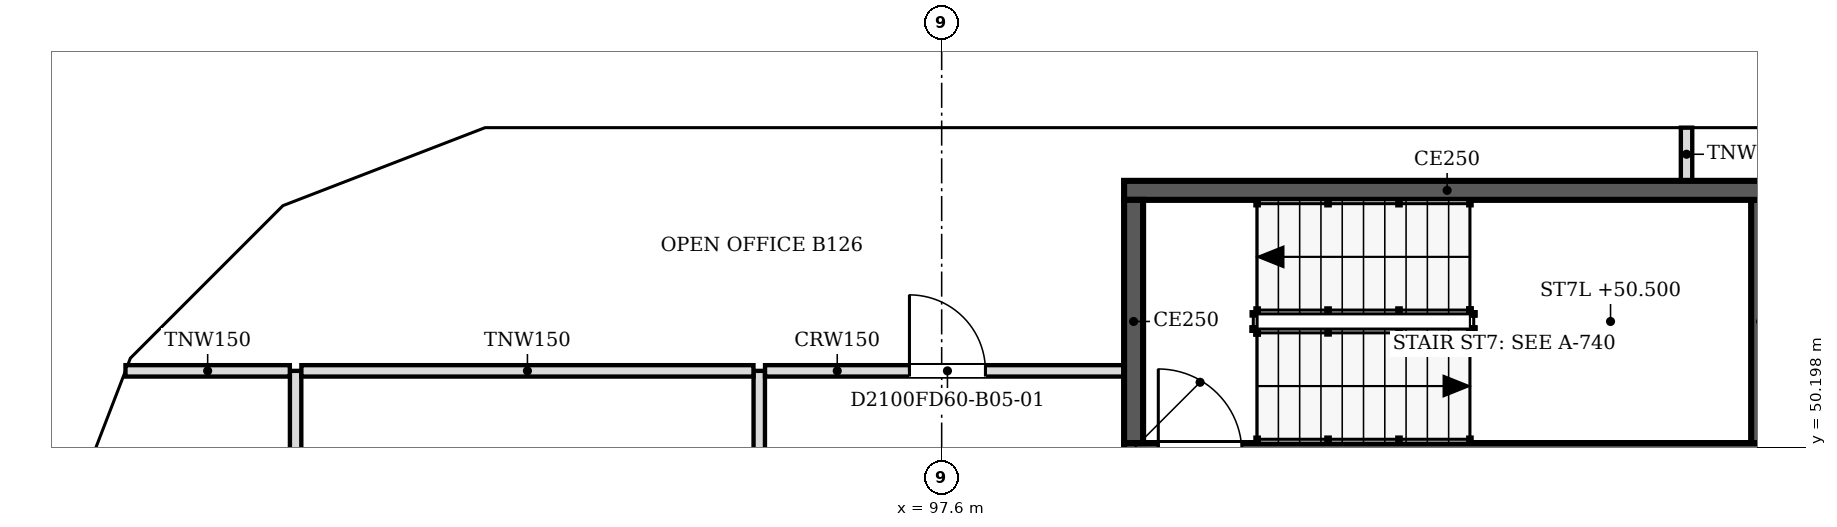
"""IFC4 building model, lengths in metres.
Left out: names, types, materials, properties, quantities, classifications, styles, units other than length and angle.
Written with IfcOpenShell. Run it as: python <this file> out.ifc"""

import sys

from ifc_helpers import new_model, si_unit, direction, frame, frame_2d, origin, place, context, subcontext, project, spatial, polyline, rectangle, outline, extrude, faceted_brep, source, transform, mapped, element, fill, save


model = new_model("IFC4")
c1 = context("Model", 3, precision=1e-05, world=origin(), true_north=direction((0.0, 1.0)))
c2 = subcontext(c1, "Body", "Model", "MODEL_VIEW")
j1 = project(units=[si_unit("LENGTHUNIT", "METRE"), si_unit("PLANEANGLEUNIT", "RADIAN")], contexts=[c1])
p1 = place(None, origin())
s1 = spatial("IfcSite", under=j1, at=p1, CompositionType="ELEMENT")
p2 = place(p1, origin())
s2 = spatial("IfcBuilding", under=s1, at=p2, CompositionType="ELEMENT")
p3 = place(p2, frame((0.0, 0.0, 48.6)))
s3 = spatial("IfcBuildingStorey", under=s2, at=p3, CompositionType="ELEMENT", Elevation=48.6)
m1 = source(origin(), c2, "Body", "SweptSolid", [
    extrude(outline(polyline([(3.05, 0.0), (6.1, 3.8), (3.05, 7.6), (0.0, 3.8), (3.05, 0.0)])), frame((0.0, 0.25, 0.0), z_axis=(0.0, -1.0, 0.0), x_axis=(1.0, 0.0, 0.0)), (0.0, 0.0, 1.0), 0.5),
])
p4 = place(p3, frame((112.85, 54.65, -3.8), z_axis=(0.0, 0.0, 1.0), x_axis=(-1.0, 0.0, 0.0)))
e1 = element("IfcWall", 1, at=p4, inside=s3, PredefinedType="SOLIDWALL", context=c2, shape_type="MappedRepresentation", body=[
    mapped(m1, transform((0.0, 0.0, 0.0), scale=1.0)),
])
m2 = source(origin(), c2, "Body", "SweptSolid", [
    extrude(outline(polyline([(3.05, 0.399), (5.78, 3.8), (3.05, 7.2), (0.321, 3.8), (3.05, 0.399)])), frame((0.0, 0.26, 0.0), z_axis=(0.0, -1.0, 0.0), x_axis=(1.0, 0.0, 0.0)), (0.0, 0.0, 1.0), 0.52),
])
p5 = place(p4, origin())
e2 = element("IfcOpeningElement", 2, at=p5, cuts=e1, PredefinedType="OPENING", context=c2, shape_type="MappedRepresentation", body=[
    mapped(m2, transform((0.0, 0.0, 0.0), scale=1.0)),
])
p6 = place(p3, frame((106.75, 54.65, -3.8), z_axis=(0.0, 0.0, 1.0), x_axis=(-1.0, 0.0, 0.0)))
e3 = element("IfcWall", 3, at=p6, inside=s3, PredefinedType="SOLIDWALL", context=c2, shape_type="MappedRepresentation", body=[
    mapped(m1, transform((0.0, 0.0, 0.0), scale=1.0)),
])
p7 = place(p6, origin())
e4 = element("IfcOpeningElement", 4, at=p7, cuts=e3, PredefinedType="OPENING", context=c2, shape_type="MappedRepresentation", body=[
    mapped(m2, transform((0.0, 0.0, 0.0), scale=1.0)),
])
m3 = source(origin(), c2, "Body", "Brep", [
    faceted_brep([(3.05, -0.25, 0.0), (6.1, -0.25, 3.8), (6.1, -0.25, 3.8), (3.05, -0.25, 7.6), (0.0, -0.25, 3.8), (0.0, 0.25, 3.8), (3.05, 0.25, 7.6), (6.1, 0.25, 3.8), (6.1, 0.25, 3.8), (3.05, 0.25, 0.0)], [[[0, 1, 2, 3, 4]], [[5, 6, 7, 8, 9]], [[9, 8, 1, 0]], [[7, 6, 3, 2]], [[6, 5, 4, 3]], [[5, 9, 0, 4]], [[1, 8, 7, 2]]]),
])
p8 = place(p3, frame((100.65, 54.65, -3.8), z_axis=(0.0, 0.0, 1.0), x_axis=(-1.0, 0.0, 0.0)))
e5 = element("IfcWall", 5, at=p8, inside=s3, PredefinedType="SOLIDWALL", context=c2, shape_type="MappedRepresentation", body=[
    mapped(m3, transform((0.0, 0.0, 0.0), scale=1.0)),
])
p9 = place(p8, origin())
e6 = element("IfcOpeningElement", 6, at=p9, cuts=e5, PredefinedType="OPENING", context=c2, shape_type="MappedRepresentation", body=[
    mapped(m2, transform((0.0, 0.0, 0.0), scale=1.0)),
])
m4 = source(origin(), c2, "Body", "Brep", [
    faceted_brep([(3.003, -0.25, 0.0), (3.05, -0.25, 0.06), (3.05, -0.25, 7.54), (3.003, -0.25, 7.6), (0.0, -0.25, 3.8), (0.0, 0.25, 3.8), (2.957, 0.25, 7.541), (2.957, 0.25, 0.059), (3.003, 0.0, 0.0), (3.003, 0.0, 7.6)], [[[0, 1, 2, 3, 4]], [[5, 6, 7]], [[1, 0, 8]], [[9, 3, 2]], [[6, 5, 4, 3, 9]], [[5, 7, 8, 0, 4]], [[1, 8, 7, 6, 9, 2]]]),
])
p10 = place(p3, frame((94.55, 54.65, -3.8), z_axis=(0.0, 0.0, 1.0), x_axis=(-1.0, 0.0, 0.0)))
e7 = element("IfcWall", 7, at=p10, inside=s3, PredefinedType="SOLIDWALL", context=c2, shape_type="MappedRepresentation", body=[
    mapped(m4, transform((0.0, 0.0, 0.0), scale=1.0)),
])
m5 = source(origin(), c2, "Body", "SweptSolid", [
    extrude(outline(polyline([(2.803, 6.944), (0.319, 3.8), (2.803, 0.656), (2.803, 6.944)])), frame((0.0, 0.26, 0.0), z_axis=(0.0, -1.0, 0.0), x_axis=(1.0, 0.0, 0.0)), (0.0, 0.0, 1.0), 0.52),
])
p11 = place(p10, origin())
e8 = element("IfcOpeningElement", 8, at=p11, cuts=e7, PredefinedType="OPENING", context=c2, shape_type="MappedRepresentation", body=[
    mapped(m5, transform((0.0, 0.0, 0.0), scale=1.0)),
])
m6 = source(origin(), c2, "Body", "Brep", [
    faceted_brep([(0.047, -0.25, 0.0), (2.997, -0.25, 3.8), (0.047, -0.25, 7.6), (0.0, -0.25, 7.541), (0.0, -0.25, 0.059), (0.093, 0.25, 7.54), (2.944, 0.25, 3.868), (2.944, 0.25, 3.732), (0.093, 0.25, 0.06), (2.997, 0.0, 3.8), (0.047, 0.0, 0.0), (0.047, 0.0, 7.6)], [[[0, 1, 2, 3, 4]], [[5, 6, 7, 8]], [[8, 7, 9, 1, 0, 10]], [[6, 5, 11, 2, 1, 9]], [[3, 2, 11]], [[10, 0, 4]], [[8, 10, 4, 3, 11, 5]], [[7, 6, 9]]]),
])
p12 = place(p3, frame((91.59, 54.667, -3.8), z_axis=(0.0, 0.0, 1.0), x_axis=(-0.933000876937, -0.359874094142, 0.0)))
e9 = element("IfcWall", 9, at=p12, inside=s3, PredefinedType="SOLIDWALL", context=c2, shape_type="MappedRepresentation", body=[
    mapped(m6, transform((0.0, 0.0, 0.0), scale=1.0)),
])
m7 = source(origin(), c2, "Body", "SweptSolid", [
    extrude(outline(polyline([(0.247, 0.665), (2.681, 3.8), (0.247, 6.935), (0.247, 0.665)])), frame((0.0, 0.26, 0.0), z_axis=(0.0, -1.0, 0.0), x_axis=(1.0, 0.0, 0.0)), (0.0, 0.0, 1.0), 0.52),
])
p13 = place(p12, origin())
e10 = element("IfcOpeningElement", 10, at=p13, cuts=e9, PredefinedType="OPENING", context=c2, shape_type="MappedRepresentation", body=[
    mapped(m7, transform((0.0, 0.0, 0.0), scale=1.0)),
])
m8 = source(origin(), c2, "Body", "Brep", [
    faceted_brep([(2.944, -0.25, 0.0), (2.997, -0.25, 0.068), (2.997, -0.25, 7.532), (2.944, -0.25, 7.6), (0.0, -0.25, 3.8), (0.053, 0.25, 3.868), (2.891, 0.25, 7.532), (2.891, 0.25, 0.068), (0.053, 0.25, 3.732), (2.944, 0.0, 0.0), (2.944, 0.0, 7.6), (0.0, 0.0, 3.8)], [[[0, 1, 2, 3, 4]], [[5, 6, 7, 8]], [[1, 0, 9]], [[10, 3, 2]], [[6, 5, 11, 4, 3, 10]], [[8, 7, 9, 0, 4, 11]], [[8, 11, 5]], [[1, 9, 7, 6, 10, 2]]]),
])
p14 = place(p3, frame((88.794, 53.588, -3.8), z_axis=(0.0, 0.0, 1.0), x_axis=(-0.707066050402, -0.707147509625, 0.0)))
e11 = element("IfcWall", 11, at=p14, inside=s3, PredefinedType="SOLIDWALL", context=c2, shape_type="MappedRepresentation", body=[
    mapped(m8, transform((0.0, 0.0, 0.0), scale=1.0)),
])
m9 = source(origin(), c2, "Body", "SweptSolid", [
    extrude(outline(polyline([(2.744, 6.934), (0.316, 3.8), (2.744, 0.666), (2.744, 6.934)])), frame((0.0, 0.26, 0.0), z_axis=(0.0, -1.0, 0.0), x_axis=(1.0, 0.0, 0.0)), (0.0, 0.0, 1.0), 0.52),
])
p15 = place(p14, origin())
e12 = element("IfcOpeningElement", 12, at=p15, cuts=e11, PredefinedType="OPENING", context=c2, shape_type="MappedRepresentation", body=[
    mapped(m9, transform((0.0, 0.0, 0.0), scale=1.0)),
])
m10 = source(origin(), c2, "Body", "Brep", [
    faceted_brep([(0.053, -0.25, 0.0), (3.003, -0.25, 3.8), (0.053, -0.25, 7.6), (0.0, -0.25, 7.531), (0.0, -0.25, 0.068), (0.106, 0.25, 7.532), (2.957, 0.25, 3.86), (2.957, 0.25, 3.74), (0.106, 0.25, 0.068), (3.003, 0.0, 3.8), (0.053, 0.0, 0.0), (0.053, 0.0, 7.6)], [[[0, 1, 2, 3, 4]], [[5, 6, 7, 8]], [[8, 7, 9, 1, 0, 10]], [[6, 5, 11, 2, 1, 9]], [[3, 2, 11]], [[10, 0, 4]], [[8, 10, 4, 3, 11, 5]], [[7, 6, 9]]]),
])
p16 = place(p3, frame((86.731, 51.556, -3.8), z_axis=(0.0, 0.0, 1.0), x_axis=(-0.359855894603, -0.933007896601, 0.0)))
e13 = element("IfcWall", 13, at=p16, inside=s3, PredefinedType="SOLIDWALL", context=c2, shape_type="MappedRepresentation", body=[
    mapped(m10, transform((0.0, 0.0, 0.0), scale=1.0)),
])
m11 = source(origin(), c2, "Body", "SweptSolid", [
    extrude(outline(polyline([(0.253, 0.665), (2.687, 3.8), (0.253, 6.935), (0.253, 0.665)])), frame((0.0, 0.26, 0.0), z_axis=(0.0, -1.0, 0.0), x_axis=(1.0, 0.0, 0.0)), (0.0, 0.0, 1.0), 0.52),
])
p17 = place(p16, origin())
e14 = element("IfcOpeningElement", 14, at=p17, cuts=e13, PredefinedType="OPENING", context=c2, shape_type="MappedRepresentation", body=[
    mapped(m11, transform((0.0, 0.0, 0.0), scale=1.0)),
])
p18 = place(p2, frame((0.0, 0.0, 52.4)))
s4 = spatial("IfcBuildingStorey", under=s2, at=p18, CompositionType="ELEMENT", Elevation=52.4)
m12 = source(origin(), c2, "Body", "SweptSolid", [
    extrude(outline(polyline([(3.05, 0.0), (6.1, 3.8), (3.05, 7.6), (0.0, 3.8), (3.05, 0.0)])), frame((0.0, 0.25, 0.0), z_axis=(0.0, -1.0, 0.0), x_axis=(1.0, 0.0, 0.0)), (0.0, 0.0, 1.0), 0.5),
])
p19 = place(p18, frame((109.8, 54.65, -3.8), z_axis=(0.0, 0.0, 1.0), x_axis=(-1.0, 0.0, 0.0)))
e15 = element("IfcWall", 15, at=p19, inside=s4, PredefinedType="SOLIDWALL", context=c2, shape_type="MappedRepresentation", body=[
    mapped(m12, transform((0.0, 0.0, 0.0), scale=1.0)),
])
m13 = source(origin(), c2, "Body", "SweptSolid", [
    extrude(outline(polyline([(3.05, 0.399), (5.78, 3.8), (3.05, 7.2), (0.321, 3.8), (3.05, 0.399)])), frame((0.0, 0.26, 0.0), z_axis=(0.0, -1.0, 0.0), x_axis=(1.0, 0.0, 0.0)), (0.0, 0.0, 1.0), 0.52),
])
p20 = place(p19, origin())
e16 = element("IfcOpeningElement", 16, at=p20, cuts=e15, PredefinedType="OPENING", context=c2, shape_type="MappedRepresentation", body=[
    mapped(m13, transform((0.0, 0.0, 0.0), scale=1.0)),
])
m14 = source(origin(), c2, "Body", "Brep", [
    faceted_brep([(3.05, -0.25, 0.0), (6.1, -0.25, 3.8), (6.1, -0.25, 3.8), (3.05, -0.25, 7.6), (0.0, -0.25, 3.8), (0.0, 0.25, 3.8), (3.05, 0.25, 7.6), (6.1, 0.25, 3.8), (6.1, 0.25, 3.8), (3.05, 0.25, 0.0)], [[[0, 1, 2, 3, 4]], [[5, 6, 7, 8, 9]], [[9, 8, 1, 0]], [[7, 6, 3, 2]], [[6, 5, 4, 3]], [[5, 9, 0, 4]], [[1, 8, 7, 2]]]),
])
p21 = place(p18, frame((103.7, 54.65, -3.8), z_axis=(0.0, 0.0, 1.0), x_axis=(-1.0, 0.0, 0.0)))
e17 = element("IfcWall", 17, at=p21, inside=s4, PredefinedType="SOLIDWALL", context=c2, shape_type="MappedRepresentation", body=[
    mapped(m14, transform((0.0, 0.0, 0.0), scale=1.0)),
])
p22 = place(p21, origin())
e18 = element("IfcOpeningElement", 18, at=p22, cuts=e17, PredefinedType="OPENING", context=c2, shape_type="MappedRepresentation", body=[
    mapped(m13, transform((0.0, 0.0, 0.0), scale=1.0)),
])
m15 = source(origin(), c2, "Body", "Brep", [
    faceted_brep([(3.05, -0.25, 0.0), (6.053, -0.25, 3.8), (3.05, -0.25, 7.6), (0.0, -0.25, 3.8), (0.0, 0.25, 3.8), (3.05, 0.25, 7.6), (6.007, 0.25, 3.859), (6.007, 0.25, 3.741), (3.05, 0.25, 0.0), (6.053, 0.0, 3.8)], [[[0, 1, 2, 3]], [[4, 5, 6, 7, 8]], [[8, 7, 9, 1, 0]], [[6, 5, 2, 1, 9]], [[5, 4, 3, 2]], [[4, 8, 0, 3]], [[9, 7, 6]]]),
])
p23 = place(p18, frame((97.6, 54.65, -3.8), z_axis=(0.0, 0.0, 1.0), x_axis=(-1.0, 0.0, 0.0)))
e19 = element("IfcWall", 19, at=p23, inside=s4, PredefinedType="SOLIDWALL", context=c2, shape_type="MappedRepresentation", body=[
    mapped(m15, transform((0.0, 0.0, 0.0), scale=1.0)),
])
m16 = source(origin(), c2, "Body", "SweptSolid", [
    extrude(outline(polyline([(3.049, 0.401), (5.735, 3.8), (3.049, 7.199), (0.321, 3.8), (3.049, 0.401)])), frame((0.0, 0.26, 0.0), z_axis=(0.0, -1.0, 0.0), x_axis=(1.0, 0.0, 0.0)), (0.0, 0.0, 1.0), 0.52),
])
p24 = place(p23, origin())
e20 = element("IfcOpeningElement", 20, at=p24, cuts=e19, PredefinedType="OPENING", context=c2, shape_type="MappedRepresentation", body=[
    mapped(m16, transform((0.0, 0.0, 0.0), scale=1.0)),
])
m17 = source(origin(), c2, "Body", "Brep", [
    faceted_brep([(2.95, -0.25, 0.0), (3.003, -0.25, 0.068), (3.003, -0.25, 7.531), (2.95, -0.25, 7.6), (0.0, -0.25, 3.8), (0.047, 0.25, 3.86), (2.898, 0.25, 7.532), (2.898, 0.25, 0.068), (0.047, 0.25, 3.74), (2.95, 0.0, 0.0), (2.95, 0.0, 7.6), (0.0, 0.0, 3.8)], [[[0, 1, 2, 3, 4]], [[5, 6, 7, 8]], [[1, 0, 9]], [[10, 3, 2]], [[6, 5, 11, 4, 3, 10]], [[8, 7, 9, 0, 4, 11]], [[8, 11, 5]], [[1, 9, 7, 6, 10, 2]]]),
])
p25 = place(p18, frame((91.547, 54.65, -3.8), z_axis=(0.0, 0.0, 1.0), x_axis=(-0.933007896601, -0.359855894603, 0.0)))
e21 = element("IfcWall", 21, at=p25, inside=s4, PredefinedType="SOLIDWALL", context=c2, shape_type="MappedRepresentation", body=[
    mapped(m17, transform((0.0, 0.0, 0.0), scale=1.0)),
])
m18 = source(origin(), c2, "Body", "SweptSolid", [
    extrude(outline(polyline([(2.75, 6.935), (0.316, 3.8), (2.75, 0.665), (2.75, 6.935)])), frame((0.0, 0.26, 0.0), z_axis=(0.0, -1.0, 0.0), x_axis=(1.0, 0.0, 0.0)), (0.0, 0.0, 1.0), 0.52),
])
p26 = place(p25, origin())
e22 = element("IfcOpeningElement", 22, at=p26, cuts=e21, PredefinedType="OPENING", context=c2, shape_type="MappedRepresentation", body=[
    mapped(m18, transform((0.0, 0.0, 0.0), scale=1.0)),
])
m19 = source(origin(), c2, "Body", "Brep", [
    faceted_brep([(0.053, -0.25, 0.0), (2.997, -0.25, 3.8), (0.053, -0.25, 7.6), (0.0, -0.25, 7.532), (0.0, -0.25, 0.068), (0.106, 0.25, 7.531), (2.944, 0.25, 3.868), (2.944, 0.25, 3.732), (0.106, 0.25, 0.068), (2.997, 0.0, 3.8), (0.053, 0.0, 0.0), (0.053, 0.0, 7.6)], [[[0, 1, 2, 3, 4]], [[5, 6, 7, 8]], [[8, 7, 9, 1, 0, 10]], [[6, 5, 11, 2, 1, 9]], [[3, 2, 11]], [[10, 0, 4]], [[8, 10, 4, 3, 11, 5]], [[9, 7, 6]]]),
])
p27 = place(p18, frame((88.831, 53.625, -3.8), z_axis=(0.0, 0.0, 1.0), x_axis=(-0.707147509625, -0.707066050402, 0.0)))
e23 = element("IfcWall", 23, at=p27, inside=s4, PredefinedType="SOLIDWALL", context=c2, shape_type="MappedRepresentation", body=[
    mapped(m19, transform((0.0, 0.0, 0.0), scale=1.0)),
])
m20 = source(origin(), c2, "Body", "SweptSolid", [
    extrude(outline(polyline([(0.253, 0.666), (2.681, 3.8), (0.253, 6.934), (0.253, 0.666)])), frame((0.0, 0.26, 0.0), z_axis=(0.0, -1.0, 0.0), x_axis=(1.0, 0.0, 0.0)), (0.0, 0.0, 1.0), 0.52),
])
p28 = place(p27, origin())
e24 = element("IfcOpeningElement", 24, at=p28, cuts=e23, PredefinedType="OPENING", context=c2, shape_type="MappedRepresentation", body=[
    mapped(m20, transform((0.0, 0.0, 0.0), scale=1.0)),
])
m21 = source(origin(), c2, "Body", "Brep", [
    faceted_brep([(2.95, -0.25, 0.0), (2.997, -0.25, 0.059), (2.997, -0.25, 7.541), (2.95, -0.25, 7.6), (0.0, -0.25, 3.8), (0.053, 0.25, 3.868), (2.904, 0.25, 7.54), (2.904, 0.25, 0.06), (0.053, 0.25, 3.732), (2.95, 0.0, 0.0), (2.95, 0.0, 7.6), (0.0, 0.0, 3.8)], [[[0, 1, 2, 3, 4]], [[5, 6, 7, 8]], [[1, 0, 9]], [[10, 3, 2]], [[6, 5, 11, 4, 3, 10]], [[8, 7, 9, 0, 4, 11]], [[8, 11, 5]], [[1, 9, 7, 6, 10, 2]]]),
])
p29 = place(p18, frame((86.712, 51.506, -3.8), z_axis=(0.0, 0.0, 1.0), x_axis=(-0.359874094142, -0.933000876937, 0.0)))
e25 = element("IfcWall", 25, at=p29, inside=s4, PredefinedType="SOLIDWALL", context=c2, shape_type="MappedRepresentation", body=[
    mapped(m21, transform((0.0, 0.0, 0.0), scale=1.0)),
])
p30 = place(p29, origin())
e26 = element("IfcOpeningElement", 26, at=p30, cuts=e25, PredefinedType="OPENING", context=c2, shape_type="MappedRepresentation", body=[
    mapped(m18, transform((0.0, 0.0, 0.0), scale=1.0)),
])
p31 = place(p3, frame((108.5, 50.125, 0.0), z_axis=(0.0, 0.0, 1.0), x_axis=(-1.0, 0.0, 0.0)))
e27 = element("IfcWall", 27, at=p31, inside=s3, PredefinedType="SOLIDWALL", context=c2, shape_type="SweptSolid", body=[
    extrude(rectangle(XDim=8.5, YDim=0.25, at=frame_2d((4.25, 0.0))), origin(), (0.0, 0.0, 1.0), 3.8),
])
m22 = source(origin(), c2, "Body", "SweptSolid", [
    extrude(rectangle(XDim=1.1, YDim=2.1, at=frame_2d((0.55, 1.05))), frame((0.0, 0.135, 0.0), z_axis=(0.0, -1.0, 0.0), x_axis=(1.0, 0.0, 0.0)), (0.0, 0.0, 1.0), 0.27),
])
p32 = place(p31, frame((6.95, 0.0, 0.0)))
e28 = element("IfcOpeningElement", 28, at=p32, cuts=e27, PredefinedType="OPENING", context=c2, shape_type="MappedRepresentation", body=[
    mapped(m22, transform((0.0, 0.0, 0.0), scale=1.0)),
])
p33 = place(p3, frame((100.125, 50.25, 0.0), z_axis=(0.0, 0.0, 1.0), x_axis=(0.0, 1.0, 0.0)))
e29 = element("IfcWall", 29, at=p33, inside=s3, PredefinedType="SOLIDWALL", context=c2, shape_type="SweptSolid", body=[
    extrude(rectangle(XDim=3.2, YDim=0.25, at=frame_2d((1.6, 0.0))), origin(), (0.0, 0.0, 1.0), 3.8),
])
p34 = place(p3, frame((100.0, 53.575, 0.0), z_axis=(0.0, 0.0, 1.0), x_axis=(1.0, 0.0, 0.0)))
e30 = element("IfcWall", 30, at=p34, inside=s3, PredefinedType="SOLIDWALL", context=c2, shape_type="SweptSolid", body=[
    extrude(rectangle(XDim=8.5, YDim=0.25, at=frame_2d((4.25, 0.0))), origin(), (0.0, 0.0, 1.0), 3.8),
])
p35 = place(p3, frame((108.375, 53.45, 0.0), z_axis=(0.0, 0.0, 1.0), x_axis=(0.0, -1.0, 0.0)))
e31 = element("IfcWall", 31, at=p35, inside=s3, PredefinedType="SOLIDWALL", context=c2, shape_type="SweptSolid", body=[
    extrude(rectangle(XDim=3.2, YDim=0.25, at=frame_2d((1.6, 0.0))), origin(), (0.0, 0.0, 1.0), 3.8),
])
p36 = place(p3, frame((95.2, 36.6, 0.0), z_axis=(0.0, 0.0, 1.0), x_axis=(0.0, 1.0, 0.0)))
e32 = element("IfcWall", 32, at=p36, inside=s3, PredefinedType="PARTITIONING", context=c2, shape_type="SweptSolid", body=[
    extrude(rectangle(XDim=14.6, YDim=0.15, at=frame_2d((7.3, 0.0))), origin(), (0.0, 0.0, 1.0), 3.067),
])
m23 = source(origin(), c2, "Body", "SweptSolid", [
    extrude(rectangle(XDim=1.8, YDim=2.1, at=frame_2d((0.9, 1.05))), frame((0.0, 0.085, 0.0), z_axis=(0.0, -1.0, 0.0), x_axis=(1.0, 0.0, 0.0)), (0.0, 0.0, 1.0), 0.17),
])
p37 = place(p36, frame((9.4, 0.0, 0.0)))
e33 = element("IfcOpeningElement", 33, at=p37, cuts=e32, PredefinedType="OPENING", context=c2, shape_type="MappedRepresentation", body=[
    mapped(m23, transform((0.0, 0.0, 0.0), scale=1.0)),
])
p38 = place(p3, frame((89.1, 42.6, 0.0), z_axis=(0.0, 0.0, 1.0), x_axis=(0.0, 1.0, 0.0)))
e34 = element("IfcWall", 34, at=p38, inside=s3, PredefinedType="PARTITIONING", context=c2, shape_type="SweptSolid", body=[
    extrude(rectangle(XDim=8.6, YDim=0.15, at=frame_2d((4.3, 0.0))), origin(), (0.0, 0.0, 1.0), 3.067),
])
m24 = source(origin(), c2, "Body", "SweptSolid", [
    extrude(rectangle(XDim=0.9, YDim=2.1, at=frame_2d((0.45, 1.05))), frame((0.0, 0.085, 0.0), z_axis=(0.0, -1.0, 0.0), x_axis=(1.0, 0.0, 0.0)), (0.0, 0.0, 1.0), 0.17),
])
p39 = place(p38, frame((3.8, 0.0, 0.0)))
e35 = element("IfcOpeningElement", 35, at=p39, cuts=e34, PredefinedType="OPENING", context=c2, shape_type="MappedRepresentation", body=[
    mapped(m24, transform((0.0, 0.0, 0.0), scale=1.0)),
])
p40 = place(p3, frame((86.862, 51.2, 0.0), z_axis=(0.0, 0.0, 1.0), x_axis=(1.0, 0.0, 0.0)))
e36 = element("IfcWall", 36, at=p40, inside=s3, PredefinedType="PARTITIONING", context=c2, shape_type="SweptSolid", body=[
    extrude(rectangle(XDim=2.162, YDim=0.15, at=frame_2d((1.081, 0.0))), origin(), (0.0, 0.0, 1.0), 3.067),
])
p41 = place(p3, frame((89.176, 51.2, 0.0), z_axis=(0.0, 0.0, 1.0), x_axis=(1.0, 0.0, 0.0)))
e37 = element("IfcWall", 37, at=p41, inside=s3, PredefinedType="PARTITIONING", context=c2, shape_type="SweptSolid", body=[
    extrude(rectangle(XDim=5.948, YDim=0.15, at=frame_2d((2.974, 0.0))), origin(), (0.0, 0.0, 1.0), 3.067),
])
p42 = place(p3, frame((95.276, 51.2, 0.0), z_axis=(0.0, 0.0, 1.0), x_axis=(1.0, 0.0, 0.0)))
e38 = element("IfcWall", 38, at=p42, inside=s3, PredefinedType="PARTITIONING", context=c2, shape_type="SweptSolid", body=[
    extrude(rectangle(XDim=4.724, YDim=0.15, at=frame_2d((2.362, 0.0))), origin(), (0.0, 0.0, 1.0), 3.067),
])
m25 = source(origin(), c2, "Body", "SweptSolid", [
    extrude(rectangle(XDim=1.0, YDim=2.1, at=frame_2d((0.5, 1.05))), frame((0.0, 0.085, 0.0), z_axis=(0.0, -1.0, 0.0), x_axis=(1.0, 0.0, 0.0)), (0.0, 0.0, 1.0), 0.17),
])
p43 = place(p42, frame((1.9, 0.0, 0.0)))
e39 = element("IfcOpeningElement", 39, at=p43, cuts=e38, PredefinedType="OPENING", context=c2, shape_type="MappedRepresentation", body=[
    mapped(m25, transform((0.0, 0.0, 0.0), scale=1.0)),
])
p44 = place(p3, frame((107.4, 53.7, 0.0), z_axis=(0.0, 0.0, 1.0), x_axis=(0.0, 1.0, 0.0)))
e40 = element("IfcWall", 40, at=p44, inside=s3, PredefinedType="PARTITIONING", context=c2, shape_type="SweptSolid", body=[
    extrude(rectangle(XDim=0.7, YDim=0.15, at=frame_2d((0.35, 0.0))), origin(), (0.0, 0.0, 1.0), 3.067),
])
m26 = source(origin(), c2, "Body", "SweptSolid", [
    extrude(rectangle(XDim=1.0, YDim=2.1, at=frame_2d((0.5, 1.05))), frame((0.0, 0.025, 0.0), z_axis=(0.0, -1.0, 0.0), x_axis=(1.0, 0.0, 0.0)), (0.0, 0.0, 1.0), 0.05),
])
p45 = place(p43, origin())
e41 = element("IfcDoor", 41, at=p45, inside=s3, OperationType="SINGLE_SWING_LEFT", PredefinedType="DOOR", context=c2, shape_type="MappedRepresentation", body=[
    mapped(m26, transform((0.0, 0.0, 0.0), scale=1.0)),
])
fill(e39, e41)
save(model, sys.argv[1])
